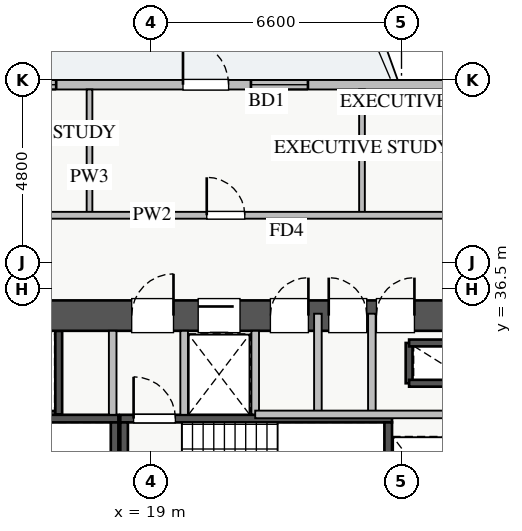
"""IFC4 building model, lengths in metres.
Left out: names, types, materials, properties, quantities, classifications, styles, units other than length and angle.
Written with IfcOpenShell. Run it as: python <this file> out.ifc"""

import sys

from ifc_helpers import new_model, si_unit, direction, frame, frame_2d, origin, place, context, subcontext, project, spatial, rectangle, extrude, source, transform, mapped, element, fill, save


model = new_model("IFC4")
c1 = context("Model", 3, precision=1e-05, world=origin(), true_north=direction((0.0, 1.0)))
c2 = subcontext(c1, "Body", "Model", "MODEL_VIEW")
j1 = project(units=[si_unit("LENGTHUNIT", "METRE"), si_unit("PLANEANGLEUNIT", "RADIAN")], contexts=[c1])
p1 = place(None, origin())
s1 = spatial("IfcSite", under=j1, at=p1, CompositionType="ELEMENT")
p2 = place(p1, origin())
s2 = spatial("IfcBuilding", under=s1, at=p2, CompositionType="ELEMENT")
p3 = place(p2, frame((0.0, 0.0, 32.75)))
s3 = spatial("IfcBuildingStorey", under=s2, at=p3, CompositionType="ELEMENT", Elevation=32.75)
p4 = place(p3, frame((25.8, 34.02, 0.0), z_axis=(0.0, 0.0, 1.0), x_axis=(0.0, 1.0, 0.0)))
e1 = element("IfcWall", 1, at=p4, inside=s3, PredefinedType="SHEAR", context=c2, shape_type="SweptSolid", body=[
    extrude(rectangle(XDim=1.06, YDim=0.18, at=frame_2d((0.53, 0.0))), origin(), (0.0, 0.0, 1.0), 3.07),
])
for number, where, z_axis, x_axis in (
    (2, (25.8, 35.08, 0.0), (0.0, 0.0, 1.0), (1.0, 0.0, 0.0)),
    (3, (25.8, 34.02, 0.0), (0.0, 0.0, 1.0), (1.0, 0.0, 0.0)),
):
    element("IfcWall", number, at=place(p3, frame(where, z_axis=z_axis, x_axis=x_axis)), inside=s3, PredefinedType="SHEAR", context=c2, shape_type="SweptSolid", body=[
        extrude(rectangle(XDim=1.2, YDim=0.18, at=frame_2d((0.6, 0.0))), origin(), (0.0, 0.0, 1.0), 3.07),
    ])
p5 = place(p3, frame((14.62, 33.2, 0.0), z_axis=(0.0, 0.0, 1.0), x_axis=(1.0, 0.0, 0.0)))
e4 = element("IfcWall", 4, at=p5, inside=s3, PredefinedType="SHEAR", context=c2, shape_type="SweptSolid", body=[
    extrude(rectangle(XDim=1.96, YDim=0.18, at=frame_2d((0.98, 0.0))), origin(), (0.0, 0.0, 1.0), 3.07),
])
p6 = place(p3, frame((16.58, 33.2, 0.0), z_axis=(0.0, 0.0, 1.0), x_axis=(0.0, 1.0, 0.0)))
e5 = element("IfcWall", 5, at=p6, inside=s3, PredefinedType="SHEAR", context=c2, shape_type="SweptSolid", body=[
    extrude(rectangle(XDim=2.2, YDim=0.18, at=frame_2d((1.1, 0.0))), origin(), (0.0, 0.0, 1.0), 3.07),
])
p7 = place(p3, frame((19.88, 33.2, 0.0), z_axis=(0.0, 0.0, 1.0), x_axis=(1.0, 0.0, 0.0)))
e6 = element("IfcWall", 6, at=p7, inside=s3, PredefinedType="SHEAR", context=c2, shape_type="SweptSolid", body=[
    extrude(rectangle(XDim=1.87, YDim=0.18, at=frame_2d((0.935, 0.0))), origin(), (0.0, 0.0, 1.0), 3.07),
])
p8 = place(p3, frame((11.0, 33.09, 0.0), z_axis=(0.0, 0.0, 1.0), x_axis=(1.0, 0.0, 0.0)))
e7 = element("IfcWall", 7, at=p8, inside=s3, PredefinedType="SHEAR", context=c2, shape_type="SweptSolid", body=[
    extrude(rectangle(XDim=7.15, YDim=0.2, at=frame_2d((3.575, 0.0))), origin(), (0.0, 0.0, 1.0), 3.25),
])
p9 = place(p8, frame((0.35, 0.0, 0.0)))
e8 = element("IfcOpeningElement", 8, at=p9, cuts=e7, PredefinedType="OPENING", context=c2, shape_type="SweptSolid", body=[
    extrude(rectangle(XDim=1.1, YDim=2.05, at=frame_2d((0.55, 1.025))), frame((0.0, 0.11, 0.0), z_axis=(0.0, -1.0, 0.0), x_axis=(1.0, 0.0, 0.0)), (0.0, 0.0, 1.0), 0.22),
])
p10 = place(p3, frame((18.05, 30.05, 0.0), z_axis=(0.0, 0.0, 1.0), x_axis=(0.0, 1.0, 0.0)))
e9 = element("IfcWall", 9, at=p10, inside=s3, PredefinedType="SHEAR", context=c2, shape_type="SweptSolid", body=[
    extrude(rectangle(XDim=2.94, YDim=0.2, at=frame_2d((1.47, 0.0))), origin(), (0.0, 0.0, 1.0), 3.25),
])
p11 = place(p3, frame((18.2, 33.09, 0.0), z_axis=(0.0, 0.0, 1.0), x_axis=(1.0, 0.0, 0.0)))
e10 = element("IfcWall", 10, at=p11, inside=s3, PredefinedType="SHEAR", context=c2, shape_type="SweptSolid", body=[
    extrude(rectangle(XDim=7.15, YDim=0.2, at=frame_2d((3.575, 0.0))), origin(), (0.0, 0.0, 1.0), 3.25),
])
p12 = place(p11, frame((0.35, 0.0, 0.0)))
e11 = element("IfcOpeningElement", 11, at=p12, cuts=e10, PredefinedType="OPENING", context=c2, shape_type="SweptSolid", body=[
    extrude(rectangle(XDim=1.1, YDim=2.05, at=frame_2d((0.55, 1.025))), frame((0.0, 0.11, 0.0), z_axis=(0.0, -1.0, 0.0), x_axis=(1.0, 0.0, 0.0)), (0.0, 0.0, 1.0), 0.22),
])
for number, where, z_axis, x_axis in (
    (12, (18.3, 30.05, 0.0), (0.0, 0.0, 1.0), (0.0, 1.0, 0.0)),
    (13, (25.25, 30.05, 0.0), (0.0, 0.0, 1.0), (0.0, 1.0, 0.0)),
):
    element("IfcWall", number, at=place(p3, frame(where, z_axis=z_axis, x_axis=x_axis)), inside=s3, PredefinedType="SHEAR", context=c2, shape_type="SweptSolid", body=[
        extrude(rectangle(XDim=2.94, YDim=0.2, at=frame_2d((1.47, 0.0))), origin(), (0.0, 0.0, 1.0), 3.25),
    ])
p13 = place(p3, frame((10.2, 35.8, 0.0), z_axis=(0.0, 0.0, 1.0), x_axis=(1.0, 0.0, 0.0)))
e14 = element("IfcWall", 14, at=p13, inside=s3, PredefinedType="SHEAR", context=c2, shape_type="SweptSolid", body=[
    extrude(rectangle(XDim=17.6, YDim=0.8, at=frame_2d((8.8, 0.0))), origin(), (0.0, 0.0, 1.0), 3.25),
])
p14 = place(p13, frame((1.15, 0.0, 0.0)))
e15 = element("IfcOpeningElement", 15, at=p14, cuts=e14, PredefinedType="OPENING", context=c2, shape_type="SweptSolid", body=[
    extrude(rectangle(XDim=1.1, YDim=2.05, at=frame_2d((0.55, 1.025))), frame((0.0, 0.41, 0.0), z_axis=(0.0, -1.0, 0.0), x_axis=(1.0, 0.0, 0.0)), (0.0, 0.0, 1.0), 0.82),
])
p15 = place(p13, frame((8.3, 0.0, 0.0)))
e16 = element("IfcOpeningElement", 16, at=p15, cuts=e14, PredefinedType="OPENING", context=c2, shape_type="SweptSolid", body=[
    extrude(rectangle(XDim=1.1, YDim=2.05, at=frame_2d((0.55, 1.025))), frame((0.0, 0.41, 0.0), z_axis=(0.0, -1.0, 0.0), x_axis=(1.0, 0.0, 0.0)), (0.0, 0.0, 1.0), 0.82),
])
p16 = place(p13, frame((10.05, 0.0, 0.0)))
e17 = element("IfcOpeningElement", 17, at=p16, cuts=e14, PredefinedType="OPENING", context=c2, shape_type="SweptSolid", body=[
    extrude(rectangle(XDim=1.1, YDim=2.05, at=frame_2d((0.55, 1.025))), frame((0.0, 0.41, 0.0), z_axis=(0.0, -1.0, 0.0), x_axis=(1.0, 0.0, 0.0)), (0.0, 0.0, 1.0), 0.82),
])
p17 = place(p13, frame((14.74, 0.0, 0.0)))
e18 = element("IfcOpeningElement", 18, at=p17, cuts=e14, PredefinedType="OPENING", context=c2, shape_type="SweptSolid", body=[
    extrude(rectangle(XDim=1.0, YDim=2.05, at=frame_2d((0.5, 1.025))), frame((0.0, 0.41, 0.0), z_axis=(0.0, -1.0, 0.0), x_axis=(1.0, 0.0, 0.0)), (0.0, 0.0, 1.0), 0.82),
])
p18 = place(p13, frame((11.95, 0.0, 0.0)))
e19 = element("IfcOpeningElement", 19, at=p18, cuts=e14, PredefinedType="OPENING", context=c2, shape_type="SweptSolid", body=[
    extrude(rectangle(XDim=1.0, YDim=2.05, at=frame_2d((0.5, 1.025))), frame((0.0, 0.41, 0.0), z_axis=(0.0, -1.0, 0.0), x_axis=(1.0, 0.0, 0.0)), (0.0, 0.0, 1.0), 0.82),
])
p19 = place(p13, frame((13.485, 0.0, 0.0)))
e20 = element("IfcOpeningElement", 20, at=p19, cuts=e14, PredefinedType="OPENING", context=c2, shape_type="SweptSolid", body=[
    extrude(rectangle(XDim=1.0, YDim=2.05, at=frame_2d((0.5, 1.025))), frame((0.0, 0.41, 0.0), z_axis=(0.0, -1.0, 0.0), x_axis=(1.0, 0.0, 0.0)), (0.0, 0.0, 1.0), 0.82),
])
p20 = place(p3, frame((5.45, 41.875, 0.0), z_axis=(0.0, 0.0, 1.0), x_axis=(1.0, 0.0, 0.0)))
e21 = element("IfcWall", 21, at=p20, inside=s3, PredefinedType="STANDARD", context=c2, shape_type="SweptSolid", body=[
    extrude(rectangle(XDim=27.1, YDim=0.25, at=frame_2d((13.55, 0.0))), origin(), (0.0, 0.0, 1.0), 2.61),
])
p21 = place(p20, frame((14.4, 0.0, 0.0)))
e22 = element("IfcOpeningElement", 22, at=p21, cuts=e21, PredefinedType="OPENING", context=c2, shape_type="SweptSolid", body=[
    extrude(rectangle(XDim=1.2, YDim=2.1, at=frame_2d((0.6, 1.05))), frame((0.0, 0.135, 0.0), z_axis=(0.0, -1.0, 0.0), x_axis=(1.0, 0.0, 0.0)), (0.0, 0.0, 1.0), 0.27),
])
p22 = place(p20, frame((1.365, 0.0, 0.9)))
e23 = element("IfcOpeningElement", 23, at=p22, cuts=e21, PredefinedType="OPENING", context=c2, shape_type="SweptSolid", body=[
    extrude(rectangle(XDim=1.8, YDim=1.5, at=frame_2d((0.9, 0.75))), frame((0.0, 0.135, 0.0), z_axis=(0.0, -1.0, 0.0), x_axis=(1.0, 0.0, 0.0)), (0.0, 0.0, 1.0), 0.27),
])
p23 = place(p20, frame((9.263, 0.0, 0.9)))
e24 = element("IfcOpeningElement", 24, at=p23, cuts=e21, PredefinedType="OPENING", context=c2, shape_type="SweptSolid", body=[
    extrude(rectangle(XDim=1.8, YDim=1.45, at=frame_2d((0.9, 0.725))), frame((0.0, 0.135, 0.0), z_axis=(0.0, -1.0, 0.0), x_axis=(1.0, 0.0, 0.0)), (0.0, 0.0, 1.0), 0.27),
])
p24 = place(p20, frame((16.188, 0.0, 0.9)))
e25 = element("IfcOpeningElement", 25, at=p24, cuts=e21, PredefinedType="OPENING", context=c2, shape_type="SweptSolid", body=[
    extrude(rectangle(XDim=1.5, YDim=1.45, at=frame_2d((0.75, 0.725))), frame((0.0, 0.135, 0.0), z_axis=(0.0, -1.0, 0.0), x_axis=(1.0, 0.0, 0.0)), (0.0, 0.0, 1.0), 0.27),
])
p25 = place(p20, frame((22.663, 0.0, 0.9)))
e26 = element("IfcOpeningElement", 26, at=p25, cuts=e21, PredefinedType="OPENING", context=c2, shape_type="SweptSolid", body=[
    extrude(rectangle(XDim=2.1, YDim=1.48, at=frame_2d((1.05, 0.74))), frame((0.0, 0.135, 0.0), z_axis=(0.0, -1.0, 0.0), x_axis=(1.0, 0.0, 0.0)), (0.0, 0.0, 1.0), 0.27),
])
p26 = place(p20, frame((5.149, 0.0, 0.9)))
e27 = element("IfcOpeningElement", 27, at=p26, cuts=e21, PredefinedType="OPENING", context=c2, shape_type="SweptSolid", body=[
    extrude(rectangle(XDim=2.4, YDim=1.5, at=frame_2d((1.2, 0.75))), frame((0.0, 0.135, 0.0), z_axis=(0.0, -1.0, 0.0), x_axis=(1.0, 0.0, 0.0)), (0.0, 0.0, 1.0), 0.27),
])
for number, where, z_axis, x_axis in (
    (28, (18.0, 33.19, 0.0), (0.0, 0.0, 1.0), (0.0, 1.0, 0.0)),
    (29, (19.88, 33.19, 0.0), (0.0, 0.0, 1.0), (0.0, 1.0, 0.0)),
):
    element("IfcWall", number, at=place(p3, frame(where, z_axis=z_axis, x_axis=x_axis)), inside=s3, PredefinedType="PARTITIONING", context=c2, shape_type="SweptSolid", body=[
        extrude(rectangle(XDim=2.21, YDim=0.2, at=frame_2d((1.105, 0.0))), origin(), (0.0, 0.0, 1.0), 3.07),
    ])
p27 = place(p3, frame((24.82, 33.2, 0.0), z_axis=(0.0, 0.0, 1.0), x_axis=(0.0, 1.0, 0.0)))
e30 = element("IfcWall", 30, at=p27, inside=s3, PredefinedType="PARTITIONING", context=c2, shape_type="SweptSolid", body=[
    extrude(rectangle(XDim=2.65, YDim=0.2, at=frame_2d((1.325, 0.0))), origin(), (0.0, 0.0, 1.0), 3.07),
])
p28 = place(p3, frame((21.75, 33.2, 0.0), z_axis=(0.0, 0.0, 1.0), x_axis=(0.0, 1.0, 0.0)))
e31 = element("IfcWall", 31, at=p28, inside=s3, PredefinedType="PARTITIONING", context=c2, shape_type="SweptSolid", body=[
    extrude(rectangle(XDim=2.2, YDim=0.2, at=frame_2d((1.1, 0.0))), origin(), (0.0, 0.0, 1.0), 3.07),
])
p29 = place(p3, frame((23.4, 33.2, 0.0), z_axis=(0.0, 0.0, 1.0), x_axis=(0.0, 1.0, 0.0)))
e32 = element("IfcWall", 32, at=p29, inside=s3, PredefinedType="PARTITIONING", context=c2, shape_type="SweptSolid", body=[
    extrude(rectangle(XDim=2.65, YDim=0.2, at=frame_2d((1.325, 0.0))), origin(), (0.0, 0.0, 1.0), 3.07),
])
p30 = place(p3, frame((21.75, 33.2, 0.0), z_axis=(0.0, 0.0, 1.0), x_axis=(1.0, 0.0, 0.0)))
e33 = element("IfcWall", 33, at=p30, inside=s3, PredefinedType="PARTITIONING", context=c2, shape_type="SweptSolid", body=[
    extrude(rectangle(XDim=5.17, YDim=0.2, at=frame_2d((2.585, 0.0))), origin(), (0.0, 0.0, 1.0), 3.07),
])
for number, where, z_axis, x_axis in (
    (34, (17.39, 38.44, 0.0), (0.0, 0.0, 1.0), (0.0, 1.0, 0.0)),
    (35, (24.56, 38.44, 0.0), (0.0, 0.0, 1.0), (0.0, 1.0, 0.0)),
):
    element("IfcWall", number, at=place(p3, frame(where, z_axis=z_axis, x_axis=x_axis)), inside=s3, PredefinedType="PARTITIONING", context=c2, shape_type="SweptSolid", body=[
        extrude(rectangle(XDim=3.31, YDim=0.15, at=frame_2d((1.655, 0.0))), origin(), (0.0, 0.0, 1.0), 3.07),
    ])
p31 = place(p3, frame((8.85, 38.44, 0.0), z_axis=(0.0, 0.0, 1.0), x_axis=(1.0, 0.0, 0.0)))
e36 = element("IfcWall", 36, at=p31, inside=s3, PredefinedType="PARTITIONING", context=c2, shape_type="SweptSolid", body=[
    extrude(rectangle(XDim=23.57, YDim=0.18, at=frame_2d((11.785, 0.0))), origin(), (0.0, 0.0, 1.0), 3.07),
])
p32 = place(p31, frame((3.77, 0.0, 0.0)))
e37 = element("IfcOpeningElement", 37, at=p32, cuts=e36, PredefinedType="OPENING", context=c2, shape_type="SweptSolid", body=[
    extrude(rectangle(XDim=1.0, YDim=2.05, at=frame_2d((0.5, 1.025))), frame((0.0, 0.1, 0.0), z_axis=(0.0, -1.0, 0.0), x_axis=(1.0, 0.0, 0.0)), (0.0, 0.0, 1.0), 0.2),
])
p33 = place(p31, frame((11.625, 0.0, 0.0)))
e38 = element("IfcOpeningElement", 38, at=p33, cuts=e36, PredefinedType="OPENING", context=c2, shape_type="SweptSolid", body=[
    extrude(rectangle(XDim=1.0, YDim=2.05, at=frame_2d((0.5, 1.025))), frame((0.0, 0.1, 0.0), z_axis=(0.0, -1.0, 0.0), x_axis=(1.0, 0.0, 0.0)), (0.0, 0.0, 1.0), 0.2),
])
p34 = place(p31, frame((19.14, 0.0, 0.0)))
e39 = element("IfcOpeningElement", 39, at=p34, cuts=e36, PredefinedType="OPENING", context=c2, shape_type="SweptSolid", body=[
    extrude(rectangle(XDim=1.0, YDim=2.05, at=frame_2d((0.5, 1.025))), frame((0.0, 0.1, 0.0), z_axis=(0.0, -1.0, 0.0), x_axis=(1.0, 0.0, 0.0)), (0.0, 0.0, 1.0), 0.2),
])
m1 = source(origin(), c2, "Body", "SweptSolid", [
    extrude(rectangle(XDim=1.2, YDim=2.1, at=frame_2d((0.6, 1.05))), frame((0.0, 0.025, 0.0), z_axis=(0.0, -1.0, 0.0), x_axis=(1.0, 0.0, 0.0)), (0.0, 0.0, 1.0), 0.05),
])
p35 = place(p21, origin())
e40 = element("IfcDoor", 40, at=p35, inside=s3, OperationType="SINGLE_SWING_LEFT", PredefinedType="DOOR", context=c2, shape_type="MappedRepresentation", body=[
    mapped(m1, transform((0.0, 0.0, 0.0), x_axis=(1.0, 0.0, 0.0), y_axis=(0.0, 1.0, 0.0), z_axis=(0.0, 0.0, 1.0), scale=1.0)),
])
fill(e22, e40)
m2 = source(origin(), c2, "Body", "SweptSolid", [
    extrude(rectangle(XDim=1.8, YDim=1.45, at=frame_2d((0.9, 0.725))), frame((0.0, 0.03, 0.0), z_axis=(0.0, -1.0, 0.0), x_axis=(1.0, 0.0, 0.0)), (0.0, 0.0, 1.0), 0.06),
])
p36 = place(p23, origin())
e41 = element("IfcWindow", 41, at=p36, inside=s3, PartitioningType="DOUBLE_PANEL_VERTICAL", PredefinedType="WINDOW", context=c2, shape_type="MappedRepresentation", body=[
    mapped(m2, transform((0.0, 0.0, 0.0), x_axis=(1.0, 0.0, 0.0), y_axis=(0.0, 1.0, 0.0), z_axis=(0.0, 0.0, 1.0), scale=1.0)),
])
fill(e24, e41)
m3 = source(origin(), c2, "Body", "SweptSolid", [
    extrude(rectangle(XDim=1.5, YDim=1.45, at=frame_2d((0.75, 0.725))), frame((0.0, 0.03, 0.0), z_axis=(0.0, -1.0, 0.0), x_axis=(1.0, 0.0, 0.0)), (0.0, 0.0, 1.0), 0.06),
])
p37 = place(p24, origin())
e42 = element("IfcWindow", 42, at=p37, inside=s3, PartitioningType="DOUBLE_PANEL_VERTICAL", PredefinedType="WINDOW", context=c2, shape_type="MappedRepresentation", body=[
    mapped(m3, transform((0.0, 0.0, 0.0), x_axis=(1.0, 0.0, 0.0), y_axis=(0.0, 1.0, 0.0), z_axis=(0.0, 0.0, 1.0), scale=1.0)),
])
fill(e25, e42)
m4 = source(origin(), c2, "Body", "SweptSolid", [
    extrude(rectangle(XDim=1.1, YDim=2.05, at=frame_2d((0.55, 1.025))), frame((0.0, 0.025, 0.0), z_axis=(0.0, -1.0, 0.0), x_axis=(1.0, 0.0, 0.0)), (0.0, 0.0, 1.0), 0.05),
])
p38 = place(p15, origin())
e43 = element("IfcDoor", 43, at=p38, inside=s3, OperationType="SINGLE_SWING_RIGHT", PredefinedType="DOOR", context=c2, shape_type="MappedRepresentation", body=[
    mapped(m4, transform((0.0, 0.0, 0.0), x_axis=(1.0, 0.0, 0.0), y_axis=(0.0, 1.0, 0.0), z_axis=(0.0, 0.0, 1.0), scale=1.0)),
])
fill(e16, e43)
p39 = place(p12, origin())
e44 = element("IfcDoor", 44, at=p39, inside=s3, OperationType="SINGLE_SWING_LEFT", PredefinedType="DOOR", context=c2, shape_type="MappedRepresentation", body=[
    mapped(m4, transform((0.0, 0.0, 0.0), x_axis=(1.0, 0.0, 0.0), y_axis=(0.0, 1.0, 0.0), z_axis=(0.0, 0.0, 1.0), scale=1.0)),
])
fill(e11, e44)
p40 = place(p16, origin())
e45 = element("IfcDoor", 45, at=p40, inside=s3, OperationType="SLIDING_TO_LEFT", PredefinedType="DOOR", context=c2, shape_type="MappedRepresentation", body=[
    mapped(m4, transform((0.0, 0.0, 0.0), x_axis=(1.0, 0.0, 0.0), y_axis=(0.0, 1.0, 0.0), z_axis=(0.0, 0.0, 1.0), scale=1.0)),
])
fill(e17, e45)
m5 = source(origin(), c2, "Body", "SweptSolid", [
    extrude(rectangle(XDim=1.0, YDim=2.05, at=frame_2d((0.5, 1.025))), frame((0.0, 0.025, 0.0), z_axis=(0.0, -1.0, 0.0), x_axis=(1.0, 0.0, 0.0)), (0.0, 0.0, 1.0), 0.05),
])
p41 = place(p17, origin())
e46 = element("IfcDoor", 46, at=p41, inside=s3, OperationType="SINGLE_SWING_RIGHT", PredefinedType="DOOR", context=c2, shape_type="MappedRepresentation", body=[
    mapped(m5, transform((0.0, 0.0, 0.0), x_axis=(1.0, 0.0, 0.0), y_axis=(0.0, 1.0, 0.0), z_axis=(0.0, 0.0, 1.0), scale=1.0)),
])
fill(e18, e46)
p42 = place(p18, origin())
e47 = element("IfcDoor", 47, at=p42, inside=s3, OperationType="SINGLE_SWING_RIGHT", PredefinedType="DOOR", context=c2, shape_type="MappedRepresentation", body=[
    mapped(m5, transform((0.0, 0.0, 0.0), x_axis=(1.0, 0.0, 0.0), y_axis=(0.0, 1.0, 0.0), z_axis=(0.0, 0.0, 1.0), scale=1.0)),
])
fill(e19, e47)
p43 = place(p19, origin())
e48 = element("IfcDoor", 48, at=p43, inside=s3, OperationType="SINGLE_SWING_LEFT", PredefinedType="DOOR", context=c2, shape_type="MappedRepresentation", body=[
    mapped(m5, transform((0.0, 0.0, 0.0), x_axis=(1.0, 0.0, 0.0), y_axis=(0.0, 1.0, 0.0), z_axis=(0.0, 0.0, 1.0), scale=1.0)),
])
fill(e20, e48)
p44 = place(p33, origin())
e49 = element("IfcDoor", 49, at=p44, inside=s3, OperationType="SINGLE_SWING_LEFT", PredefinedType="DOOR", context=c2, shape_type="MappedRepresentation", body=[
    mapped(m5, transform((0.0, 0.0, 0.0), x_axis=(1.0, 0.0, 0.0), y_axis=(0.0, 1.0, 0.0), z_axis=(0.0, 0.0, 1.0), scale=1.0)),
])
fill(e38, e49)
save(model, sys.argv[1])
